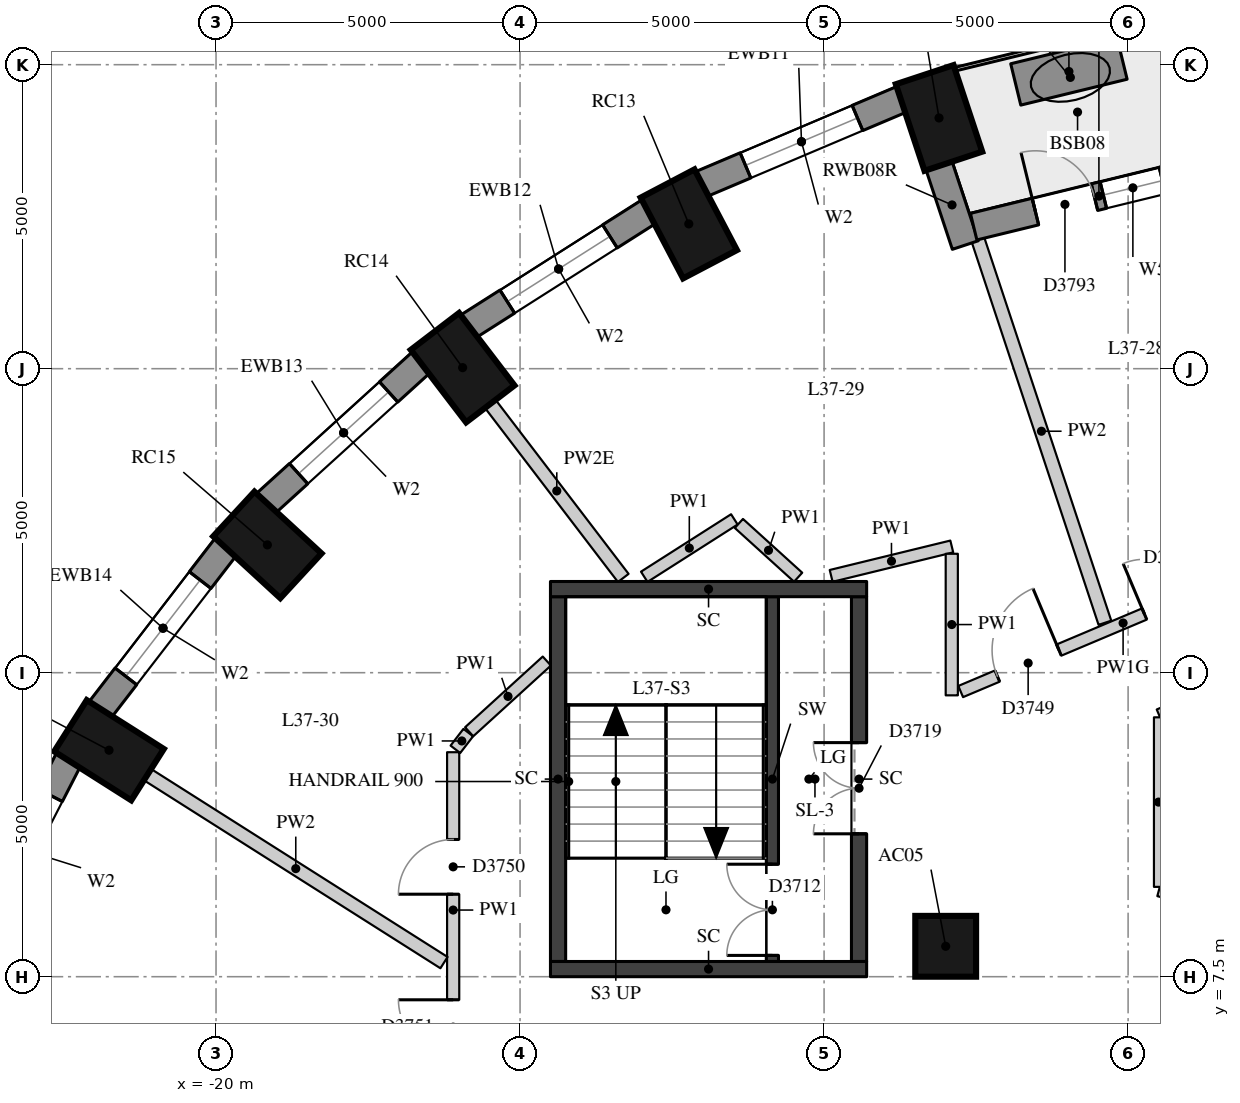
"""IFC4 building model, lengths in metres.
Left out: names, types, materials, properties, quantities, classifications, styles, units other than length and angle.
Written with IfcOpenShell. Run it as: python <this file> out.ifc"""

import sys

from ifc_helpers import new_model, si_unit, direction, frame, frame_2d, origin, origin_2d, place, context, subcontext, project, spatial, rectangle, extrude, element, fill, save


model = new_model("IFC4")
c1 = context("Model", 3, precision=1e-05, world=origin(), true_north=direction((0.0, 1.0)))
c2 = subcontext(c1, "Body", "Model", "MODEL_VIEW")
j1 = project(units=[si_unit("LENGTHUNIT", "METRE"), si_unit("PLANEANGLEUNIT", "RADIAN")], contexts=[c1])
p1 = place(None, origin())
s1 = spatial("IfcSite", under=j1, at=p1, CompositionType="ELEMENT")
p2 = place(p1, origin())
s2 = spatial("IfcBuilding", under=s1, at=p2, CompositionType="ELEMENT")
p3 = place(p2, frame((0.0, 0.0, 131.8)))
s3 = spatial("IfcBuildingStorey", under=s2, at=p3, CompositionType="ELEMENT", Elevation=131.8)
for number, where, z_axis, x_axis in (
    (1, (-8.11, 21.624, 0.0), (0.0, 0.0, 1.0), (-0.315, 0.949, 0.0)),
    (2, (-12.225, 19.882, 0.0), (0.0, 0.0, 1.0), (-0.465, 0.885, 0.0)),
    (3, (-15.945, 17.517, 0.0), (0.0, 0.0, 1.0), (-0.607, 0.795, 0.0)),
    (4, (-19.156, 14.602, 0.0), (0.0, 0.0, 1.0), (-0.735, 0.678, 0.0)),
    (5, (-21.76, 11.225, 0.0), (0.0, 0.0, 1.0), (-0.845, 0.536, 0.0)),
):
    element("IfcColumn", number, at=place(p3, frame(where, z_axis=z_axis, x_axis=x_axis)), inside=s3, PredefinedType="COLUMN", context=c2, shape_type="SweptSolid", body=[
        extrude(rectangle(XDim=1.5, YDim=1.0, at=origin_2d()), origin(), (0.0, 0.0, 1.0), 3.3),
    ])
p4 = place(p3, frame((-8.0, 8.0, 0.0), z_axis=(0.0, 0.0, 1.0), x_axis=(1.0, 0.0, 0.0)))
e6 = element("IfcColumn", 6, at=p4, inside=s3, PredefinedType="COLUMN", context=c2, shape_type="SweptSolid", body=[
    extrude(rectangle(XDim=1.0, YDim=1.0, at=origin_2d()), origin(), (0.0, 0.0, 1.0), 3.3),
])
p5 = place(p3, frame((-8.718, 21.934, 0.0), z_axis=(0.0, 0.0, 1.0), x_axis=(-0.920879975612, -0.389846213932, 0.0)))
e7 = element("IfcWall", 7, at=p5, inside=s3, PredefinedType="SOLIDWALL", context=c2, shape_type="SweptSolid", body=[
    extrude(rectangle(XDim=3.592, YDim=0.45, at=frame_2d((1.796, 0.0))), origin(), (0.0, 0.0, 1.0), 2.85),
])
p6 = place(p5, frame((0.796, 0.0, 0.4)))
e8 = element("IfcOpeningElement", 8, at=p6, cuts=e7, PredefinedType="OPENING", context=c2, shape_type="SweptSolid", body=[
    extrude(rectangle(XDim=2.0, YDim=1.75, at=frame_2d((1.0, 0.875))), frame((0.0, 0.235, 0.0), z_axis=(0.0, -1.0, 0.0), x_axis=(1.0, 0.0, 0.0)), (0.0, 0.0, 1.0), 0.47),
])
p7 = place(p3, frame((-12.875, 20.087, 0.0), z_axis=(0.0, 0.0, 1.0), x_axis=(-0.843860651879, -0.536562391722, 0.0)))
e9 = element("IfcWall", 9, at=p7, inside=s3, PredefinedType="SOLIDWALL", context=c2, shape_type="SweptSolid", body=[
    extrude(rectangle(XDim=3.532, YDim=0.45, at=frame_2d((1.766, 0.0))), origin(), (0.0, 0.0, 1.0), 2.85),
])
p8 = place(p7, frame((0.766, 0.0, 0.4)))
e10 = element("IfcOpeningElement", 10, at=p8, cuts=e9, PredefinedType="OPENING", context=c2, shape_type="SweptSolid", body=[
    extrude(rectangle(XDim=2.0, YDim=1.75, at=frame_2d((1.0, 0.875))), frame((0.0, 0.235, 0.0), z_axis=(0.0, -1.0, 0.0), x_axis=(1.0, 0.0, 0.0)), (0.0, 0.0, 1.0), 0.47),
])
p9 = place(p3, frame((-16.62, 17.61, 0.0), z_axis=(0.0, 0.0, 1.0), x_axis=(-0.74032902847, -0.672244694739, 0.0)))
e11 = element("IfcWall", 11, at=p9, inside=s3, PredefinedType="SOLIDWALL", context=c2, shape_type="SweptSolid", body=[
    extrude(rectangle(XDim=3.464, YDim=0.45, at=frame_2d((1.732, 0.0))), origin(), (0.0, 0.0, 1.0), 2.85),
])
p10 = place(p9, frame((0.732, 0.0, 0.4)))
e12 = element("IfcOpeningElement", 12, at=p10, cuts=e11, PredefinedType="OPENING", context=c2, shape_type="SweptSolid", body=[
    extrude(rectangle(XDim=2.0, YDim=1.75, at=frame_2d((1.0, 0.875))), frame((0.0, 0.235, 0.0), z_axis=(0.0, -1.0, 0.0), x_axis=(1.0, 0.0, 0.0)), (0.0, 0.0, 1.0), 0.47),
])
p11 = place(p3, frame((-19.835, 14.575, 0.0), z_axis=(0.0, 0.0, 1.0), x_axis=(-0.610693945156, -0.791866721961, 0.0)))
e13 = element("IfcWall", 13, at=p11, inside=s3, PredefinedType="SOLIDWALL", context=c2, shape_type="SweptSolid", body=[
    extrude(rectangle(XDim=3.395, YDim=0.45, at=frame_2d((1.697, 0.0))), origin(), (0.0, 0.0, 1.0), 2.85),
])
p12 = place(p11, frame((0.697, 0.0, 0.4)))
e14 = element("IfcOpeningElement", 14, at=p12, cuts=e13, PredefinedType="OPENING", context=c2, shape_type="SweptSolid", body=[
    extrude(rectangle(XDim=2.0, YDim=1.75, at=frame_2d((1.0, 0.875))), frame((0.0, 0.235, 0.0), z_axis=(0.0, -1.0, 0.0), x_axis=(1.0, 0.0, 0.0)), (0.0, 0.0, 1.0), 0.47),
])
p13 = place(p3, frame((-22.423, 11.077, 0.0), z_axis=(0.0, 0.0, 1.0), x_axis=(-0.456828186229, -0.889554949549, 0.0)))
e15 = element("IfcWall", 15, at=p13, inside=s3, PredefinedType="SOLIDWALL", context=c2, shape_type="SweptSolid", body=[
    extrude(rectangle(XDim=3.333, YDim=0.45, at=frame_2d((1.667, 0.0))), origin(), (0.0, 0.0, 1.0), 2.85),
])
p14 = place(p13, frame((0.666, 0.0, 0.4)))
e16 = element("IfcOpeningElement", 16, at=p14, cuts=e15, PredefinedType="OPENING", context=c2, shape_type="SweptSolid", body=[
    extrude(rectangle(XDim=2.0, YDim=1.75, at=frame_2d((1.0, 0.875))), frame((0.0, 0.235, 0.0), z_axis=(0.0, -1.0, 0.0), x_axis=(1.0, 0.0, 0.0)), (0.0, 0.0, 1.0), 0.47),
])
p15 = place(p3, frame((-8.114, 20.853, 0.0), z_axis=(0.0, 0.0, 1.0), x_axis=(0.314488854508, -0.949261165534, 0.0)))
e17 = element("IfcWall", 17, at=p15, inside=s3, PredefinedType="SOLIDWALL", context=c2, shape_type="SweptSolid", body=[
    extrude(rectangle(XDim=1.39, YDim=0.45, at=frame_2d((0.695, 0.0))), origin(), (0.0, 0.0, 1.0), 2.85),
])
p16 = place(p3, frame((-3.42, 20.841, 0.0), z_axis=(0.0, 0.0, 1.0), x_axis=(-0.971511611373, -0.23699195971, 0.0)))
e18 = element("IfcWall", 18, at=p16, inside=s3, PredefinedType="SOLIDWALL", context=c2, shape_type="SweptSolid", body=[
    extrude(rectangle(XDim=4.241, YDim=0.45, at=frame_2d((2.121, 0.0))), origin(), (0.0, 0.0, 1.0), 2.85),
])
p17 = place(p16, frame((1.045, 0.0, 0.4)))
e19 = element("IfcOpeningElement", 19, at=p17, cuts=e18, PredefinedType="OPENING", context=c2, shape_type="SweptSolid", body=[
    extrude(rectangle(XDim=1.0, YDim=1.75, at=frame_2d((0.5, 0.875))), frame((0.0, 0.235, 0.0), z_axis=(0.0, -1.0, 0.0), x_axis=(1.0, 0.0, 0.0)), (0.0, 0.0, 1.0), 0.47),
])
p18 = place(p16, frame((2.196, 0.0, 0.0)))
e20 = element("IfcOpeningElement", 20, at=p18, cuts=e18, PredefinedType="OPENING", context=c2, shape_type="SweptSolid", body=[
    extrude(rectangle(XDim=1.0, YDim=2.15, at=frame_2d((0.5, 1.075))), frame((0.0, 0.235, 0.0), z_axis=(0.0, -1.0, 0.0), x_axis=(1.0, 0.0, 0.0)), (0.0, 0.0, 1.0), 0.47),
])
p19 = place(p3, frame((-5.099, 22.601, 0.0), z_axis=(0.0, 0.0, 1.0), x_axis=(-0.971654974133, -0.23640349245, 0.0)))
e21 = element("IfcWall", 21, at=p19, inside=s3, PredefinedType="USERDEFINED", context=c2, shape_type="SweptSolid", body=[
    extrude(rectangle(XDim=1.8, YDim=0.7, at=frame_2d((0.9, 0.0))), origin(), (0.0, 0.0, 1.0), 0.75),
])
p20 = place(p3, frame((-10.85, 7.75, 0.0), z_axis=(0.0, 0.0, 1.0), x_axis=(0.0, 1.0, 0.0)))
e22 = element("IfcWall", 22, at=p20, inside=s3, PredefinedType="SHEAR", context=c2, shape_type="SweptSolid", body=[
    extrude(rectangle(XDim=6.0, YDim=0.2, at=frame_2d((3.0, 0.0))), origin(), (0.0, 0.0, 1.0), 2.85),
])
p21 = place(p20, frame((0.1, 0.0, 0.0)))
e23 = element("IfcOpeningElement", 23, at=p21, cuts=e22, PredefinedType="OPENING", context=c2, shape_type="SweptSolid", body=[
    extrude(rectangle(XDim=1.5, YDim=2.1, at=frame_2d((0.75, 1.05))), frame((0.0, 0.11, 0.0), z_axis=(0.0, -1.0, 0.0), x_axis=(1.0, 0.0, 0.0)), (0.0, 0.0, 1.0), 0.22),
])
p22 = place(p3, frame((-14.375, 7.75, -0.28), z_axis=(0.0, 0.0, 1.0), x_axis=(0.0, 1.0, 0.0)))
e24 = element("IfcWall", 24, at=p22, inside=s3, PredefinedType="SHEAR", context=c2, shape_type="SweptSolid", body=[
    extrude(rectangle(XDim=6.0, YDim=0.25, at=frame_2d((3.0, 0.0))), origin(), (0.0, 0.0, 1.0), 3.13),
])
p23 = place(p3, frame((-9.425, 7.75, -0.28), z_axis=(0.0, 0.0, 1.0), x_axis=(0.0, 1.0, 0.0)))
e25 = element("IfcWall", 25, at=p23, inside=s3, PredefinedType="SHEAR", context=c2, shape_type="SweptSolid", body=[
    extrude(rectangle(XDim=6.0, YDim=0.25, at=frame_2d((3.0, 0.0))), origin(), (0.0, 0.0, 1.0), 3.13),
])
p24 = place(p23, frame((2.1, 0.0, 0.28)))
e26 = element("IfcOpeningElement", 26, at=p24, cuts=e25, PredefinedType="OPENING", context=c2, shape_type="SweptSolid", body=[
    extrude(rectangle(XDim=1.5, YDim=2.1, at=frame_2d((0.75, 1.05))), frame((0.0, 0.135, 0.0), z_axis=(0.0, -1.0, 0.0), x_axis=(1.0, 0.0, 0.0)), (0.0, 0.0, 1.0), 0.27),
])
for number, where, z_axis, x_axis in (
    (27, (-14.5, 13.875, -0.28), (0.0, 0.0, 1.0), (1.0, 0.0, 0.0)),
    (28, (-14.5, 7.625, -0.28), (0.0, 0.0, 1.0), (1.0, 0.0, 0.0)),
):
    element("IfcWall", number, at=place(p3, frame(where, z_axis=z_axis, x_axis=x_axis)), inside=s3, PredefinedType="SHEAR", context=c2, shape_type="SweptSolid", body=[
        extrude(rectangle(XDim=5.2, YDim=0.25, at=frame_2d((2.6, 0.0))), origin(), (0.0, 0.0, 1.0), 3.13),
    ])
p25 = place(p3, frame((-16.1, 6.0, 0.0), z_axis=(0.0, 0.0, 1.0), x_axis=(0.0, 1.0, 0.0)))
e29 = element("IfcWall", 29, at=p25, inside=s3, PredefinedType="PARTITIONING", context=c2, shape_type="SweptSolid", body=[
    extrude(rectangle(XDim=5.192, YDim=0.2, at=frame_2d((2.596, 0.0))), origin(), (0.0, 0.0, 1.0), 2.85),
])
p26 = place(p25, frame((2.857, 0.0, 0.0)))
e30 = element("IfcOpeningElement", 30, at=p26, cuts=e29, PredefinedType="OPENING", context=c2, shape_type="SweptSolid", body=[
    extrude(rectangle(XDim=0.9, YDim=2.1, at=frame_2d((0.45, 1.05))), frame((0.0, 0.11, 0.0), z_axis=(0.0, -1.0, 0.0), x_axis=(1.0, 0.0, 0.0)), (0.0, 0.0, 1.0), 0.22),
])
p27 = place(p25, frame((0.22, 0.0, 0.0)))
e31 = element("IfcOpeningElement", 31, at=p27, cuts=e29, PredefinedType="OPENING", context=c2, shape_type="SweptSolid", body=[
    extrude(rectangle(XDim=0.9, YDim=2.1, at=frame_2d((0.45, 1.05))), frame((0.0, 0.11, 0.0), z_axis=(0.0, -1.0, 0.0), x_axis=(1.0, 0.0, 0.0)), (0.0, 0.0, 1.0), 0.22),
])
p28 = place(p3, frame((-16.063, 11.24, 0.0), z_axis=(0.0, 0.0, 1.0), x_axis=(0.609744747854, 0.792597844096, 0.0)))
e32 = element("IfcWall", 32, at=p28, inside=s3, PredefinedType="PARTITIONING", context=c2, shape_type="SweptSolid", body=[
    extrude(rectangle(XDim=0.347, YDim=0.2, at=frame_2d((0.174, 0.0))), origin(), (0.0, 0.0, 1.0), 2.85),
])
p29 = place(p3, frame((-15.837, 11.528, 0.0), z_axis=(0.0, 0.0, 1.0), x_axis=(0.739402681643, 0.673263450946, 0.0)))
e33 = element("IfcWall", 33, at=p29, inside=s3, PredefinedType="PARTITIONING", context=c2, shape_type="SweptSolid", body=[
    extrude(rectangle(XDim=1.728, YDim=0.2, at=frame_2d((0.864, 0.0))), origin(), (0.0, 0.0, 1.0), 2.85),
])
p30 = place(p3, frame((-12.957, 14.077, 0.0), z_axis=(0.0, 0.0, 1.0), x_axis=(0.843226410818, 0.537558573645, 0.0)))
e34 = element("IfcWall", 34, at=p30, inside=s3, PredefinedType="PARTITIONING", context=c2, shape_type="SweptSolid", body=[
    extrude(rectangle(XDim=1.757, YDim=0.2, at=frame_2d((0.878, 0.0))), origin(), (0.0, 0.0, 1.0), 2.85),
])
p31 = place(p3, frame((-11.401, 14.955, 0.0), z_axis=(0.0, 0.0, 1.0), x_axis=(0.740594498135, -0.671952222507, 0.0)))
e35 = element("IfcWall", 35, at=p31, inside=s3, PredefinedType="PARTITIONING", context=c2, shape_type="SweptSolid", body=[
    extrude(rectangle(XDim=1.316, YDim=0.2, at=frame_2d((0.658, 0.0))), origin(), (0.0, 0.0, 1.0), 2.85),
])
p32 = place(p3, frame((-9.884, 14.092, 0.0), z_axis=(0.0, 0.0, 1.0), x_axis=(0.971512281799, 0.236989211388, 0.0)))
e36 = element("IfcWall", 36, at=p32, inside=s3, PredefinedType="PARTITIONING", context=c2, shape_type="SweptSolid", body=[
    extrude(rectangle(XDim=2.042, YDim=0.2, at=frame_2d((1.021, 0.0))), origin(), (0.0, 0.0, 1.0), 2.85),
])
p33 = place(p3, frame((-7.9, 14.456, 0.0), z_axis=(0.0, 0.0, 1.0), x_axis=(0.0, -1.0, 0.0)))
e37 = element("IfcWall", 37, at=p33, inside=s3, PredefinedType="PARTITIONING", context=c2, shape_type="SweptSolid", body=[
    extrude(rectangle(XDim=2.328, YDim=0.2, at=frame_2d((1.164, 0.0))), origin(), (0.0, 0.0, 1.0), 2.85),
])
p34 = place(p3, frame((-7.753, 12.19, 0.0), z_axis=(0.0, 0.0, 1.0), x_axis=(0.921319622993, 0.388806059994, 0.0)))
e38 = element("IfcWall", 38, at=p34, inside=s3, PredefinedType="PARTITIONING", context=c2, shape_type="SweptSolid", body=[
    extrude(rectangle(XDim=5.798, YDim=0.2, at=frame_2d((2.899, 0.0))), origin(), (0.0, 0.0, 1.0), 2.4),
])
p35 = place(p34, frame((3.28, 0.0, 0.0)))
e39 = element("IfcOpeningElement", 39, at=p35, cuts=e38, PredefinedType="OPENING", context=c2, shape_type="SweptSolid", body=[
    extrude(rectangle(XDim=0.9, YDim=2.1, at=frame_2d((0.45, 1.05))), frame((0.0, 0.11, 0.0), z_axis=(0.0, -1.0, 0.0), x_axis=(1.0, 0.0, 0.0)), (0.0, 0.0, 1.0), 0.22),
])
p36 = place(p34, frame((0.654, 0.0, 0.0)))
e40 = element("IfcOpeningElement", 40, at=p36, cuts=e38, PredefinedType="OPENING", context=c2, shape_type="SweptSolid", body=[
    extrude(rectangle(XDim=1.1, YDim=2.1, at=frame_2d((0.55, 1.05))), frame((0.0, 0.11, 0.0), z_axis=(0.0, -1.0, 0.0), x_axis=(1.0, 0.0, 0.0)), (0.0, 0.0, 1.0), 0.22),
])
p37 = place(p3, frame((-4.5, 11.826, 0.0), z_axis=(0.0, 0.0, 1.0), x_axis=(0.921264033472, 0.388937759329, 0.0)))
e41 = element("IfcWall", 41, at=p37, inside=s3, PredefinedType="PARTITIONING", context=c2, shape_type="SweptSolid", body=[
    extrude(rectangle(XDim=2.552, YDim=0.15, at=frame_2d((1.276, 0.0))), origin(), (0.0, 0.0, 1.0), 2.85),
])
p38 = place(p37, frame((0.826, 0.0, 0.0)))
e42 = element("IfcOpeningElement", 42, at=p38, cuts=e41, PredefinedType="OPENING", context=c2, shape_type="SweptSolid", body=[
    extrude(rectangle(XDim=0.9, YDim=2.1, at=frame_2d((0.45, 1.05))), frame((0.0, 0.085, 0.0), z_axis=(0.0, -1.0, 0.0), x_axis=(1.0, 0.0, 0.0)), (0.0, 0.0, 1.0), 0.17),
])
p39 = place(p3, frame((-3.121, 8.528, 0.0), z_axis=(0.0, 0.0, 1.0), x_axis=(-0.965941945062, 0.258758881529, 0.0)))
e43 = element("IfcWall", 43, at=p39, inside=s3, PredefinedType="PARTITIONING", context=c2, shape_type="SweptSolid", body=[
    extrude(rectangle(XDim=1.427, YDim=0.15, at=frame_2d((0.714, 0.0))), origin(), (0.0, 0.0, 1.0), 2.3),
])
p40 = place(p3, frame((-4.5, 8.977, 0.0), z_axis=(0.0, 0.0, 1.0), x_axis=(0.0, 1.0, 0.0)))
e44 = element("IfcWall", 44, at=p40, inside=s3, PredefinedType="PARTITIONING", context=c2, shape_type="SweptSolid", body=[
    extrude(rectangle(XDim=2.789, YDim=0.15, at=frame_2d((1.394, 0.0))), origin(), (0.0, 0.0, 1.0), 2.85),
])
p41 = place(p3, frame((-7.469, 19.622, 0.0), z_axis=(0.0, 0.0, 1.0), x_axis=(0.314539081996, -0.949244523765, 0.0)))
e45 = element("IfcWall", 45, at=p41, inside=s3, PredefinedType="PARTITIONING", context=c2, shape_type="SweptSolid", body=[
    extrude(rectangle(XDim=6.638, YDim=0.22, at=frame_2d((3.319, 0.0))), origin(), (0.0, 0.0, 1.0), 2.85),
])
p42 = place(p3, frame((-15.489, 16.921, 0.0), z_axis=(0.0, 0.0, 1.0), x_axis=(0.607057591547, -0.794657838661, 0.0)))
e46 = element("IfcWall", 46, at=p42, inside=s3, PredefinedType="PARTITIONING", context=c2, shape_type="SweptSolid", body=[
    extrude(rectangle(XDim=3.602, YDim=0.22, at=frame_2d((1.801, 0.0))), origin(), (0.0, 0.0, 1.0), 2.4),
])
p43 = place(p3, frame((-21.126, 10.823, 0.0), z_axis=(0.0, 0.0, 1.0), x_axis=(0.844518840625, -0.535525842355, 0.0)))
e47 = element("IfcWall", 47, at=p43, inside=s3, PredefinedType="PARTITIONING", context=c2, shape_type="SweptSolid", body=[
    extrude(rectangle(XDim=5.773, YDim=0.22, at=frame_2d((2.887, 0.0))), origin(), (0.0, 0.0, 1.0), 2.85),
])
p44 = place(p6, origin())
e48 = element("IfcWindow", 48, at=p44, inside=s3, PartitioningType="SINGLE_PANEL", PredefinedType="WINDOW", context=c2, shape_type="SweptSolid", body=[
    extrude(rectangle(XDim=2.0, YDim=1.75, at=frame_2d((1.0, 0.875))), frame((0.0, 0.035, 0.0), z_axis=(0.0, -1.0, 0.0), x_axis=(1.0, 0.0, 0.0)), (0.0, 0.0, 1.0), 0.06),
])
fill(e8, e48)
p45 = place(p8, origin())
e49 = element("IfcWindow", 49, at=p45, inside=s3, PartitioningType="SINGLE_PANEL", PredefinedType="WINDOW", context=c2, shape_type="SweptSolid", body=[
    extrude(rectangle(XDim=2.0, YDim=1.75, at=frame_2d((1.0, 0.875))), frame((0.0, 0.035, 0.0), z_axis=(0.0, -1.0, 0.0), x_axis=(1.0, 0.0, 0.0)), (0.0, 0.0, 1.0), 0.06),
])
fill(e10, e49)
p46 = place(p10, origin())
e50 = element("IfcWindow", 50, at=p46, inside=s3, PartitioningType="SINGLE_PANEL", PredefinedType="WINDOW", context=c2, shape_type="SweptSolid", body=[
    extrude(rectangle(XDim=2.0, YDim=1.75, at=frame_2d((1.0, 0.875))), frame((0.0, 0.035, 0.0), z_axis=(0.0, -1.0, 0.0), x_axis=(1.0, 0.0, 0.0)), (0.0, 0.0, 1.0), 0.06),
])
fill(e12, e50)
p47 = place(p12, origin())
e51 = element("IfcWindow", 51, at=p47, inside=s3, PartitioningType="SINGLE_PANEL", PredefinedType="WINDOW", context=c2, shape_type="SweptSolid", body=[
    extrude(rectangle(XDim=2.0, YDim=1.75, at=frame_2d((1.0, 0.875))), frame((0.0, 0.035, 0.0), z_axis=(0.0, -1.0, 0.0), x_axis=(1.0, 0.0, 0.0)), (0.0, 0.0, 1.0), 0.06),
])
fill(e14, e51)
p48 = place(p14, origin())
e52 = element("IfcWindow", 52, at=p48, inside=s3, PartitioningType="SINGLE_PANEL", PredefinedType="WINDOW", context=c2, shape_type="SweptSolid", body=[
    extrude(rectangle(XDim=2.0, YDim=1.75, at=frame_2d((1.0, 0.875))), frame((0.0, 0.035, 0.0), z_axis=(0.0, -1.0, 0.0), x_axis=(1.0, 0.0, 0.0)), (0.0, 0.0, 1.0), 0.06),
])
fill(e16, e52)
p49 = place(p17, origin())
e53 = element("IfcWindow", 53, at=p49, inside=s3, PartitioningType="SINGLE_PANEL", PredefinedType="WINDOW", context=c2, shape_type="SweptSolid", body=[
    extrude(rectangle(XDim=1.0, YDim=1.75, at=frame_2d((0.5, 0.875))), frame((0.0, 0.035, 0.0), z_axis=(0.0, -1.0, 0.0), x_axis=(1.0, 0.0, 0.0)), (0.0, 0.0, 1.0), 0.06),
])
fill(e19, e53)
p50 = place(p18, frame((1.0, 0.0, 0.0), z_axis=(0.0, 0.0, 1.0), x_axis=(-1.0, 0.0, 0.0)))
e54 = element("IfcDoor", 54, at=p50, inside=s3, OperationType="SINGLE_SWING_LEFT", PredefinedType="DOOR", context=c2, shape_type="SweptSolid", body=[
    extrude(rectangle(XDim=1.0, YDim=2.15, at=frame_2d((0.5, 1.075))), frame((0.0, 0.075, 0.0), z_axis=(0.0, -1.0, 0.0), x_axis=(1.0, 0.0, 0.0)), (0.0, 0.0, 1.0), 0.05),
])
fill(e20, e54)
p51 = place(p21, origin())
e55 = element("IfcDoor", 55, at=p51, inside=s3, OperationType="DOUBLE_DOOR_SINGLE_SWING", PredefinedType="DOOR", context=c2, shape_type="SweptSolid", body=[
    extrude(rectangle(XDim=1.5, YDim=2.1, at=frame_2d((0.75, 1.05))), frame((0.0, 0.025, 0.0), z_axis=(0.0, -1.0, 0.0), x_axis=(1.0, 0.0, 0.0)), (0.0, 0.0, 1.0), 0.05),
])
fill(e23, e55)
p52 = place(p24, origin())
e56 = element("IfcDoor", 56, at=p52, inside=s3, OperationType="DOUBLE_DOOR_SINGLE_SWING", PredefinedType="DOOR", context=c2, shape_type="SweptSolid", body=[
    extrude(rectangle(XDim=1.5, YDim=2.1, at=frame_2d((0.75, 1.05))), frame((0.0, 0.025, 0.0), z_axis=(0.0, -1.0, 0.0), x_axis=(1.0, 0.0, 0.0)), (0.0, 0.0, 1.0), 0.05),
])
fill(e26, e56)
p53 = place(p35, origin())
e57 = element("IfcDoor", 57, at=p53, inside=s3, OperationType="SINGLE_SWING_LEFT", PredefinedType="DOOR", context=c2, shape_type="SweptSolid", body=[
    extrude(rectangle(XDim=0.9, YDim=2.1, at=frame_2d((0.45, 1.05))), frame((0.0, 0.025, 0.0), z_axis=(0.0, -1.0, 0.0), x_axis=(1.0, 0.0, 0.0)), (0.0, 0.0, 1.0), 0.05),
])
fill(e39, e57)
p54 = place(p36, origin())
e58 = element("IfcDoor", 58, at=p54, inside=s3, OperationType="SINGLE_SWING_RIGHT", PredefinedType="DOOR", context=c2, shape_type="SweptSolid", body=[
    extrude(rectangle(XDim=1.1, YDim=2.1, at=frame_2d((0.55, 1.05))), frame((0.0, 0.025, 0.0), z_axis=(0.0, -1.0, 0.0), x_axis=(1.0, 0.0, 0.0)), (0.0, 0.0, 1.0), 0.05),
])
fill(e40, e58)
p55 = place(p26, origin())
e59 = element("IfcDoor", 59, at=p55, inside=s3, OperationType="SINGLE_SWING_LEFT", PredefinedType="DOOR", context=c2, shape_type="SweptSolid", body=[
    extrude(rectangle(XDim=0.9, YDim=2.1, at=frame_2d((0.45, 1.05))), frame((0.0, 0.025, 0.0), z_axis=(0.0, -1.0, 0.0), x_axis=(1.0, 0.0, 0.0)), (0.0, 0.0, 1.0), 0.05),
])
fill(e30, e59)
p56 = place(p27, origin())
e60 = element("IfcDoor", 60, at=p56, inside=s3, OperationType="SINGLE_SWING_RIGHT", PredefinedType="DOOR", context=c2, shape_type="SweptSolid", body=[
    extrude(rectangle(XDim=0.9, YDim=2.1, at=frame_2d((0.45, 1.05))), frame((0.0, 0.025, 0.0), z_axis=(0.0, -1.0, 0.0), x_axis=(1.0, 0.0, 0.0)), (0.0, 0.0, 1.0), 0.05),
])
fill(e31, e60)
save(model, sys.argv[1])
